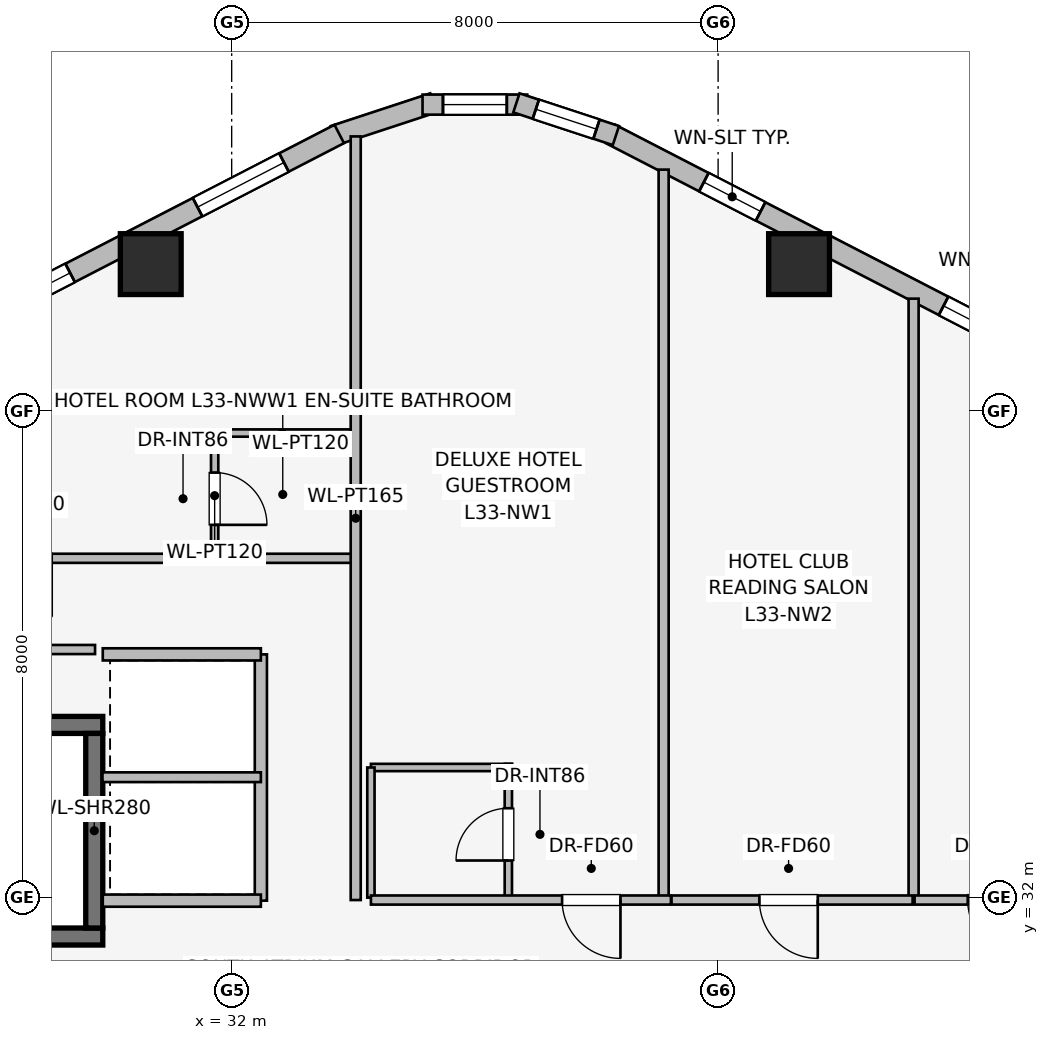
"""IFC4 building model, lengths in metres.
Left out: names, types, materials, properties, quantities, classifications, styles, units other than length and angle.
Written with IfcOpenShell. Run it as: python <this file> out.ifc"""

import sys

from ifc_helpers import new_model, si_unit, direction, frame, frame_2d, origin, origin_2d, place, context, subcontext, project, spatial, rectangle, extrude, element, fill, save


model = new_model("IFC4")
c1 = context("Model", 3, precision=1e-05, world=origin(), true_north=direction((0.0, 1.0)))
c2 = subcontext(c1, "Body", "Model", "MODEL_VIEW")
j1 = project(units=[si_unit("LENGTHUNIT", "METRE"), si_unit("PLANEANGLEUNIT", "RADIAN")], contexts=[c1])
p1 = place(None, origin())
s1 = spatial("IfcSite", under=j1, at=p1, CompositionType="ELEMENT")
p2 = place(p1, origin())
s2 = spatial("IfcBuilding", under=s1, at=p2, CompositionType="ELEMENT")
p3 = place(p2, frame((0.0, 0.0, 125.7)))
s3 = spatial("IfcBuildingStorey", under=s2, at=p3, CompositionType="ELEMENT", Elevation=125.7)
p4 = place(p3, frame((21.52, 31.36, 0.0), z_axis=(0.0, 0.0, 1.0), x_axis=(1.0, 0.0, 0.0)))
e1 = element("IfcWall", 1, at=p4, inside=s3, PredefinedType="SHEAR", context=c2, shape_type="SweptSolid", body=[
    extrude(rectangle(XDim=8.36, YDim=0.28, at=frame_2d((4.18, 0.0))), origin(), (0.0, 0.0, 1.0), 3.45),
])
p5 = place(p4, frame((0.45, 0.0, 0.0)))
e2 = element("IfcOpeningElement", 2, at=p5, cuts=e1, PredefinedType="OPENING", context=c2, shape_type="SweptSolid", body=[
    extrude(rectangle(XDim=1.05, YDim=2.0, at=frame_2d((0.525, 1.0))), frame((0.0, 0.15, 0.0), z_axis=(0.0, -1.0, 0.0), x_axis=(1.0, 0.0, 0.0)), (0.0, 0.0, 1.0), 0.3),
])
p6 = place(p3, frame((29.88, 34.84, 0.0), z_axis=(0.0, 0.0, 1.0), x_axis=(-1.0, 0.0, 0.0)))
e3 = element("IfcWall", 3, at=p6, inside=s3, PredefinedType="SHEAR", context=c2, shape_type="SweptSolid", body=[
    extrude(rectangle(XDim=8.36, YDim=0.28, at=frame_2d((4.18, 0.0))), origin(), (0.0, 0.0, 1.0), 3.45),
])
p7 = place(p3, frame((29.74, 31.5, 0.0), z_axis=(0.0, 0.0, 1.0), x_axis=(0.0, 1.0, 0.0)))
e4 = element("IfcWall", 4, at=p7, inside=s3, PredefinedType="SHEAR", context=c2, shape_type="SweptSolid", body=[
    extrude(rectangle(XDim=3.2, YDim=0.28, at=frame_2d((1.6, 0.0))), origin(), (0.0, 0.0, 1.0), 3.45),
])
for number, where, z_axis, x_axis in (
    (5, (41.331, 42.418, 0.0), (0.0, 0.0, 1.0), (1.0, 0.0, 0.0)),
    (6, (30.669, 42.418, 0.0), (0.0, 0.0, 1.0), (1.0, 0.0, 0.0)),
):
    element("IfcColumn", number, at=place(p3, frame(where, z_axis=z_axis, x_axis=x_axis)), inside=s3, PredefinedType="COLUMN", context=c2, shape_type="SweptSolid", body=[
        extrude(rectangle(XDim=1.0, YDim=1.0, at=origin_2d()), origin(), (0.0, 0.0, 1.0), 3.45),
    ])
p8 = place(p3, frame((38.231, 44.558, 0.0), z_axis=(0.0, 0.0, 1.0), x_axis=(0.888613612362, -0.458656568606, 0.0)))
e7 = element("IfcWall", 7, at=p8, inside=s3, PredefinedType="STANDARD", context=c2, shape_type="SweptSolid", body=[
    extrude(rectangle(XDim=18.681, YDim=0.34, at=frame_2d((9.34, 0.0))), origin(), (0.0, 0.0, 1.0), 3.19),
])
p9 = place(p8, frame((1.727, 0.0, 0.75)))
e8 = element("IfcOpeningElement", 8, at=p9, cuts=e7, PredefinedType="OPENING", context=c2, shape_type="SweptSolid", body=[
    extrude(rectangle(XDim=1.05, YDim=1.4, at=frame_2d((0.525, 0.7))), frame((0.0, 0.18, 0.0), z_axis=(0.0, -1.0, 0.0), x_axis=(1.0, 0.0, 0.0)), (0.0, 0.0, 1.0), 0.36),
])
p10 = place(p8, frame((6.163, 0.0, 0.75)))
e9 = element("IfcOpeningElement", 9, at=p10, cuts=e7, PredefinedType="OPENING", context=c2, shape_type="SweptSolid", body=[
    extrude(rectangle(XDim=2.1, YDim=1.5, at=frame_2d((1.05, 0.75))), frame((0.0, 0.18, 0.0), z_axis=(0.0, -1.0, 0.0), x_axis=(1.0, 0.0, 0.0)), (0.0, 0.0, 1.0), 0.36),
])
p11 = place(p8, frame((9.497, 0.0, 0.75)))
e10 = element("IfcOpeningElement", 10, at=p11, cuts=e7, PredefinedType="OPENING", context=c2, shape_type="SweptSolid", body=[
    extrude(rectangle(XDim=1.6, YDim=1.55, at=frame_2d((0.8, 0.775))), frame((0.0, 0.18, 0.0), z_axis=(0.0, -1.0, 0.0), x_axis=(1.0, 0.0, 0.0)), (0.0, 0.0, 1.0), 0.36),
])
p12 = place(p8, frame((12.728, 0.0, 0.75)))
e11 = element("IfcOpeningElement", 11, at=p12, cuts=e7, PredefinedType="OPENING", context=c2, shape_type="SweptSolid", body=[
    extrude(rectangle(XDim=1.05, YDim=1.4, at=frame_2d((0.525, 0.7))), frame((0.0, 0.18, 0.0), z_axis=(0.0, -1.0, 0.0), x_axis=(1.0, 0.0, 0.0)), (0.0, 0.0, 1.0), 0.36),
])
p13 = place(p8, frame((16.954, 0.0, 0.75)))
e12 = element("IfcOpeningElement", 12, at=p13, cuts=e7, PredefinedType="OPENING", context=c2, shape_type="SweptSolid", body=[
    extrude(rectangle(XDim=1.05, YDim=1.4, at=frame_2d((0.525, 0.7))), frame((0.0, 0.18, 0.0), z_axis=(0.0, -1.0, 0.0), x_axis=(1.0, 0.0, 0.0)), (0.0, 0.0, 1.0), 0.36),
])
p14 = place(p3, frame((33.681, 44.532, 0.0), z_axis=(0.0, 0.0, 1.0), x_axis=(0.949937416267, 0.312440242569, 0.0)))
e13 = element("IfcWall", 13, at=p14, inside=s3, PredefinedType="STANDARD", context=c2, shape_type="SweptSolid", body=[
    extrude(rectangle(XDim=1.722, YDim=0.33, at=frame_2d((0.861, 0.0))), origin(), (0.0, 0.0, 1.0), 3.19),
])
p15 = place(p3, frame((35.139, 45.041, 0.0), z_axis=(0.0, 0.0, 1.0), x_axis=(1.0, 0.0, 0.0)))
e14 = element("IfcWall", 14, at=p15, inside=s3, PredefinedType="STANDARD", context=c2, shape_type="SweptSolid", body=[
    extrude(rectangle(XDim=1.722, YDim=0.33, at=frame_2d((0.861, 0.0))), origin(), (0.0, 0.0, 1.0), 3.19),
])
p16 = place(p15, frame((0.336, 0.0, 0.75)))
e15 = element("IfcOpeningElement", 15, at=p16, cuts=e14, PredefinedType="OPENING", context=c2, shape_type="SweptSolid", body=[
    extrude(rectangle(XDim=1.05, YDim=1.4, at=frame_2d((0.525, 0.7))), frame((0.0, 0.175, 0.0), z_axis=(0.0, -1.0, 0.0), x_axis=(1.0, 0.0, 0.0)), (0.0, 0.0, 1.0), 0.35),
])
p17 = place(p3, frame((36.683, 45.07, 0.0), z_axis=(0.0, 0.0, 1.0), x_axis=(0.949937416267, -0.312440242569, 0.0)))
e16 = element("IfcWall", 16, at=p17, inside=s3, PredefinedType="STANDARD", context=c2, shape_type="SweptSolid", body=[
    extrude(rectangle(XDim=1.722, YDim=0.33, at=frame_2d((0.861, 0.0))), origin(), (0.0, 0.0, 1.0), 3.19),
])
p18 = place(p17, frame((0.336, 0.0, 0.75)))
e17 = element("IfcOpeningElement", 17, at=p18, cuts=e16, PredefinedType="OPENING", context=c2, shape_type="SweptSolid", body=[
    extrude(rectangle(XDim=1.05, YDim=1.4, at=frame_2d((0.525, 0.7))), frame((0.0, 0.175, 0.0), z_axis=(0.0, -1.0, 0.0), x_axis=(1.0, 0.0, 0.0)), (0.0, 0.0, 1.0), 0.35),
])
p19 = place(p3, frame((17.169, 35.99, 0.0), z_axis=(0.0, 0.0, 1.0), x_axis=(0.888613612362, 0.458656568606, 0.0)))
e18 = element("IfcWall", 18, at=p19, inside=s3, PredefinedType="STANDARD", context=c2, shape_type="SweptSolid", body=[
    extrude(rectangle(XDim=18.681, YDim=0.34, at=frame_2d((9.34, 0.0))), origin(), (0.0, 0.0, 1.0), 3.19),
])
p20 = place(p19, frame((1.023, 0.0, 0.75)))
e19 = element("IfcOpeningElement", 19, at=p20, cuts=e18, PredefinedType="OPENING", context=c2, shape_type="SweptSolid", body=[
    extrude(rectangle(XDim=1.6, YDim=1.55, at=frame_2d((0.8, 0.775))), frame((0.0, 0.18, 0.0), z_axis=(0.0, -1.0, 0.0), x_axis=(1.0, 0.0, 0.0)), (0.0, 0.0, 1.0), 0.36),
])
p21 = place(p19, frame((4.981, 0.0, 0.75)))
e20 = element("IfcOpeningElement", 20, at=p21, cuts=e18, PredefinedType="OPENING", context=c2, shape_type="SweptSolid", body=[
    extrude(rectangle(XDim=2.1, YDim=1.5, at=frame_2d((1.05, 0.75))), frame((0.0, 0.18, 0.0), z_axis=(0.0, -1.0, 0.0), x_axis=(1.0, 0.0, 0.0)), (0.0, 0.0, 1.0), 0.36),
])
p22 = place(p19, frame((8.29, 0.0, 0.75)))
e21 = element("IfcOpeningElement", 21, at=p22, cuts=e18, PredefinedType="OPENING", context=c2, shape_type="SweptSolid", body=[
    extrude(rectangle(XDim=2.1, YDim=1.5, at=frame_2d((1.05, 0.75))), frame((0.0, 0.18, 0.0), z_axis=(0.0, -1.0, 0.0), x_axis=(1.0, 0.0, 0.0)), (0.0, 0.0, 1.0), 0.36),
])
p23 = place(p19, frame((11.6, 0.0, 0.75)))
e22 = element("IfcOpeningElement", 22, at=p23, cuts=e18, PredefinedType="OPENING", context=c2, shape_type="SweptSolid", body=[
    extrude(rectangle(XDim=2.1, YDim=1.5, at=frame_2d((1.05, 0.75))), frame((0.0, 0.18, 0.0), z_axis=(0.0, -1.0, 0.0), x_axis=(1.0, 0.0, 0.0)), (0.0, 0.0, 1.0), 0.36),
])
p24 = place(p19, frame((16.058, 0.0, 0.75)))
e23 = element("IfcOpeningElement", 23, at=p24, cuts=e18, PredefinedType="OPENING", context=c2, shape_type="SweptSolid", body=[
    extrude(rectangle(XDim=1.6, YDim=1.55, at=frame_2d((0.8, 0.775))), frame((0.0, 0.18, 0.0), z_axis=(0.0, -1.0, 0.0), x_axis=(1.0, 0.0, 0.0)), (0.0, 0.0, 1.0), 0.36),
])
p25 = place(p3, frame((32.48, 31.95, 0.0), z_axis=(0.0, 0.0, 1.0), x_axis=(0.0, 1.0, 0.0)))
e24 = element("IfcWall", 24, at=p25, inside=s3, PredefinedType="PARTITIONING", context=c2, shape_type="SweptSolid", body=[
    extrude(rectangle(XDim=4.05, YDim=0.2, at=frame_2d((2.025, 0.0))), origin(), (0.0, 0.0, 1.0), 3.19),
])
for number, where, z_axis, x_axis in (
    (25, (29.88, 36.0, 0.0), (0.0, 0.0, 1.0), (1.0, 0.0, 0.0)),
    (26, (32.48, 31.95, 0.0), (0.0, 0.0, 1.0), (-1.0, 0.0, 0.0)),
):
    element("IfcWall", number, at=place(p3, frame(where, z_axis=z_axis, x_axis=x_axis)), inside=s3, PredefinedType="PARTITIONING", context=c2, shape_type="SweptSolid", body=[
        extrude(rectangle(XDim=2.6, YDim=0.2, at=frame_2d((1.3, 0.0))), origin(), (0.0, 0.0, 1.0), 3.19),
    ])
p26 = place(p3, frame((29.875, 33.98, 0.0), z_axis=(0.0, 0.0, 1.0), x_axis=(1.0, 0.0, 0.0)))
e27 = element("IfcWall", 27, at=p26, inside=s3, PredefinedType="PARTITIONING", context=c2, shape_type="SweptSolid", body=[
    extrude(rectangle(XDim=2.605, YDim=0.16, at=frame_2d((1.302, 0.0))), origin(), (0.0, 0.0, 1.0), 3.19),
])
p27 = place(p3, frame((34.0, 39.64, 0.0), z_axis=(0.0, 0.0, 1.0), x_axis=(-1.0, 0.0, 0.0)))
e28 = element("IfcWall", 28, at=p27, inside=s3, PredefinedType="PARTITIONING", context=c2, shape_type="SweptSolid", body=[
    extrude(rectangle(XDim=2.34, YDim=0.12, at=frame_2d((1.17, 0.0))), origin(), (0.0, 0.0, 1.0), 3.19),
])
p28 = place(p3, frame((31.72, 39.64, 0.0), z_axis=(0.0, 0.0, 1.0), x_axis=(0.0, -1.0, 0.0)))
e29 = element("IfcWall", 29, at=p28, inside=s3, PredefinedType="PARTITIONING", context=c2, shape_type="SweptSolid", body=[
    extrude(rectangle(XDim=2.06, YDim=0.12, at=frame_2d((1.03, 0.0))), origin(), (0.0, 0.0, 1.0), 3.19),
])
p29 = place(p28, frame((0.65, 0.0, 0.0)))
e30 = element("IfcOpeningElement", 30, at=p29, cuts=e29, PredefinedType="OPENING", context=c2, shape_type="SweptSolid", body=[
    extrude(rectangle(XDim=0.86, YDim=2.0, at=frame_2d((0.43, 1.0))), frame((0.0, 0.07, 0.0), z_axis=(0.0, -1.0, 0.0), x_axis=(1.0, 0.0, 0.0)), (0.0, 0.0, 1.0), 0.14),
])
p30 = place(p3, frame((34.0, 37.58, 0.0), z_axis=(0.0, 0.0, 1.0), x_axis=(-1.0, 0.0, 0.0)))
e31 = element("IfcWall", 31, at=p30, inside=s3, PredefinedType="PARTITIONING", context=c2, shape_type="SweptSolid", body=[
    extrude(rectangle(XDim=13.707, YDim=0.15, at=frame_2d((6.854, 0.0))), origin(), (0.0, 0.0, 1.0), 2.582),
])
p31 = place(p30, frame((4.96, 0.0, 0.0)))
e32 = element("IfcOpeningElement", 32, at=p31, cuts=e31, PredefinedType="OPENING", context=c2, shape_type="SweptSolid", body=[
    extrude(rectangle(XDim=0.96, YDim=2.0, at=frame_2d((0.48, 1.0))), frame((0.0, 0.085, 0.0), z_axis=(0.0, -1.0, 0.0), x_axis=(1.0, 0.0, 0.0)), (0.0, 0.0, 1.0), 0.17),
])
p32 = place(p3, frame((34.04, 31.96, 0.0), z_axis=(0.0, 0.0, 1.0), x_axis=(0.0, 1.0, 0.0)))
e33 = element("IfcWall", 33, at=p32, inside=s3, PredefinedType="PARTITIONING", context=c2, shape_type="SweptSolid", body=[
    extrude(rectangle(XDim=12.558, YDim=0.165, at=frame_2d((6.279, 0.0))), origin(), (0.0, 0.0, 1.0), 3.19),
])
p33 = place(p3, frame((39.104, 31.97, 0.0), z_axis=(0.0, 0.0, 1.0), x_axis=(0.0, 1.0, 0.0)))
e34 = element("IfcWall", 34, at=p33, inside=s3, PredefinedType="PARTITIONING", context=c2, shape_type="SweptSolid", body=[
    extrude(rectangle(XDim=12.002, YDim=0.165, at=frame_2d((6.001, 0.0))), origin(), (0.0, 0.0, 1.0), 3.19),
])
p34 = place(p3, frame((43.215, 31.97, 0.0), z_axis=(0.0, 0.0, 1.0), x_axis=(0.0, 1.0, 0.0)))
e35 = element("IfcWall", 35, at=p34, inside=s3, PredefinedType="PARTITIONING", context=c2, shape_type="SweptSolid", body=[
    extrude(rectangle(XDim=9.88, YDim=0.165, at=frame_2d((4.94, 0.0))), origin(), (0.0, 0.0, 1.0), 3.19),
])
p35 = place(p3, frame((36.55, 31.96, 0.0), z_axis=(0.0, 0.0, 1.0), x_axis=(0.0, 1.0, 0.0)))
e36 = element("IfcWall", 36, at=p35, inside=s3, PredefinedType="PARTITIONING", context=c2, shape_type="SweptSolid", body=[
    extrude(rectangle(XDim=2.24, YDim=0.12, at=frame_2d((1.12, 0.0))), origin(), (0.0, 0.0, 1.0), 3.19),
])
p36 = place(p35, frame((0.65, 0.0, 0.0)))
e37 = element("IfcOpeningElement", 37, at=p36, cuts=e36, PredefinedType="OPENING", context=c2, shape_type="SweptSolid", body=[
    extrude(rectangle(XDim=0.86, YDim=2.0, at=frame_2d((0.43, 1.0))), frame((0.0, 0.07, 0.0), z_axis=(0.0, -1.0, 0.0), x_axis=(1.0, 0.0, 0.0)), (0.0, 0.0, 1.0), 0.14),
])
p37 = place(p3, frame((36.61, 34.14, 0.0), z_axis=(0.0, 0.0, 1.0), x_axis=(-1.0, 0.0, 0.0)))
e38 = element("IfcWall", 38, at=p37, inside=s3, PredefinedType="PARTITIONING", context=c2, shape_type="SweptSolid", body=[
    extrude(rectangle(XDim=2.32, YDim=0.12, at=frame_2d((1.16, 0.0))), origin(), (0.0, 0.0, 1.0), 3.19),
])
p38 = place(p3, frame((34.29, 34.14, 0.0), z_axis=(0.0, 0.0, 1.0), x_axis=(0.0, -1.0, 0.0)))
e39 = element("IfcWall", 39, at=p38, inside=s3, PredefinedType="PARTITIONING", context=c2, shape_type="SweptSolid", body=[
    extrude(rectangle(XDim=2.14, YDim=0.12, at=frame_2d((1.07, 0.0))), origin(), (0.0, 0.0, 1.0), 3.19),
])
p39 = place(p3, frame((39.224, 31.96, 0.0), z_axis=(0.0, 0.0, 1.0), x_axis=(-1.0, 0.0, 0.0)))
e40 = element("IfcWall", 40, at=p39, inside=s3, PredefinedType="PARTITIONING", context=c2, shape_type="SweptSolid", body=[
    extrude(rectangle(XDim=4.934, YDim=0.15, at=frame_2d((2.467, 0.0))), origin(), (0.0, 0.0, 1.0), 3.19),
])
p40 = place(p39, frame((0.83, 0.0, 0.0)))
e41 = element("IfcOpeningElement", 41, at=p40, cuts=e40, PredefinedType="OPENING", context=c2, shape_type="SweptSolid", body=[
    extrude(rectangle(XDim=0.96, YDim=2.0, at=frame_2d((0.48, 1.0))), frame((0.0, 0.085, 0.0), z_axis=(0.0, -1.0, 0.0), x_axis=(1.0, 0.0, 0.0)), (0.0, 0.0, 1.0), 0.17),
])
p41 = place(p3, frame((43.199, 31.96, 0.0), z_axis=(0.0, 0.0, 1.0), x_axis=(-1.0, 0.0, 0.0)))
e42 = element("IfcWall", 42, at=p41, inside=s3, PredefinedType="PARTITIONING", context=c2, shape_type="SweptSolid", body=[
    extrude(rectangle(XDim=3.965, YDim=0.15, at=frame_2d((1.982, 0.0))), origin(), (0.0, 0.0, 1.0), 3.19),
])
p42 = place(p41, frame((1.56, 0.0, 0.0)))
e43 = element("IfcOpeningElement", 43, at=p42, cuts=e42, PredefinedType="OPENING", context=c2, shape_type="SweptSolid", body=[
    extrude(rectangle(XDim=0.96, YDim=2.0, at=frame_2d((0.48, 1.0))), frame((0.0, 0.085, 0.0), z_axis=(0.0, -1.0, 0.0), x_axis=(1.0, 0.0, 0.0)), (0.0, 0.0, 1.0), 0.17),
])
p43 = place(p3, frame((45.94, 31.96, 0.0), z_axis=(0.0, 0.0, 1.0), x_axis=(-1.0, 0.0, 0.0)))
e44 = element("IfcWall", 44, at=p43, inside=s3, PredefinedType="PARTITIONING", context=c2, shape_type="SweptSolid", body=[
    extrude(rectangle(XDim=2.709, YDim=0.15, at=frame_2d((1.354, 0.0))), origin(), (0.0, 0.0, 1.0), 3.19),
])
p44 = place(p43, frame((0.875, 0.0, 0.0)))
e45 = element("IfcOpeningElement", 45, at=p44, cuts=e44, PredefinedType="OPENING", context=c2, shape_type="SweptSolid", body=[
    extrude(rectangle(XDim=0.96, YDim=2.0, at=frame_2d((0.48, 1.0))), frame((0.0, 0.085, 0.0), z_axis=(0.0, -1.0, 0.0), x_axis=(1.0, 0.0, 0.0)), (0.0, 0.0, 1.0), 0.17),
])
p45 = place(p3, frame((29.753, 36.08, 0.0), z_axis=(0.0, 0.0, 1.0), x_axis=(-1.0, 0.0, 0.0)))
e46 = element("IfcWall", 46, at=p45, inside=s3, PredefinedType="PARTITIONING", context=c2, shape_type="SweptSolid", body=[
    extrude(rectangle(XDim=7.353, YDim=0.15, at=frame_2d((3.677, 0.0))), origin(), (0.0, 0.0, 1.0), 2.582),
])
p46 = place(p9, origin())
e47 = element("IfcWindow", 47, at=p46, inside=s3, PartitioningType="SINGLE_PANEL", PredefinedType="WINDOW", context=c2, shape_type="SweptSolid", body=[
    extrude(rectangle(XDim=1.05, YDim=1.4, at=frame_2d((0.525, 0.7))), frame((0.0, 0.03, 0.0), z_axis=(0.0, -1.0, 0.0), x_axis=(1.0, 0.0, 0.0)), (0.0, 0.0, 1.0), 0.06),
])
fill(e8, e47)
p47 = place(p10, origin())
e48 = element("IfcWindow", 48, at=p47, inside=s3, PartitioningType="SINGLE_PANEL", PredefinedType="WINDOW", context=c2, shape_type="SweptSolid", body=[
    extrude(rectangle(XDim=2.1, YDim=1.5, at=frame_2d((1.05, 0.75))), frame((0.0, 0.03, 0.0), z_axis=(0.0, -1.0, 0.0), x_axis=(1.0, 0.0, 0.0)), (0.0, 0.0, 1.0), 0.06),
])
fill(e9, e48)
p48 = place(p16, origin())
e49 = element("IfcWindow", 49, at=p48, inside=s3, PartitioningType="SINGLE_PANEL", PredefinedType="WINDOW", context=c2, shape_type="SweptSolid", body=[
    extrude(rectangle(XDim=1.05, YDim=1.4, at=frame_2d((0.525, 0.7))), frame((0.0, 0.03, 0.0), z_axis=(0.0, -1.0, 0.0), x_axis=(1.0, 0.0, 0.0)), (0.0, 0.0, 1.0), 0.06),
])
fill(e15, e49)
p49 = place(p18, origin())
e50 = element("IfcWindow", 50, at=p49, inside=s3, PartitioningType="SINGLE_PANEL", PredefinedType="WINDOW", context=c2, shape_type="SweptSolid", body=[
    extrude(rectangle(XDim=1.05, YDim=1.4, at=frame_2d((0.525, 0.7))), frame((0.0, 0.03, 0.0), z_axis=(0.0, -1.0, 0.0), x_axis=(1.0, 0.0, 0.0)), (0.0, 0.0, 1.0), 0.06),
])
fill(e17, e50)
p50 = place(p23, origin())
e51 = element("IfcWindow", 51, at=p50, inside=s3, PartitioningType="SINGLE_PANEL", PredefinedType="WINDOW", context=c2, shape_type="SweptSolid", body=[
    extrude(rectangle(XDim=2.1, YDim=1.5, at=frame_2d((1.05, 0.75))), frame((0.0, 0.03, 0.0), z_axis=(0.0, -1.0, 0.0), x_axis=(1.0, 0.0, 0.0)), (0.0, 0.0, 1.0), 0.06),
])
fill(e22, e51)
p51 = place(p24, origin())
e52 = element("IfcWindow", 52, at=p51, inside=s3, PartitioningType="SINGLE_PANEL", PredefinedType="WINDOW", context=c2, shape_type="SweptSolid", body=[
    extrude(rectangle(XDim=1.6, YDim=1.55, at=frame_2d((0.8, 0.775))), frame((0.0, 0.03, 0.0), z_axis=(0.0, -1.0, 0.0), x_axis=(1.0, 0.0, 0.0)), (0.0, 0.0, 1.0), 0.06),
])
fill(e23, e52)
p52 = place(p29, origin())
e53 = element("IfcDoor", 53, at=p52, inside=s3, OperationType="SINGLE_SWING_RIGHT", PredefinedType="DOOR", context=c2, shape_type="SweptSolid", body=[
    extrude(rectangle(XDim=0.86, YDim=2.0, at=frame_2d((0.43, 1.0))), frame((0.0, 0.025, 0.0), z_axis=(0.0, -1.0, 0.0), x_axis=(1.0, 0.0, 0.0)), (0.0, 0.0, 1.0), 0.05),
])
fill(e30, e53)
p53 = place(p36, origin())
e54 = element("IfcDoor", 54, at=p53, inside=s3, OperationType="SINGLE_SWING_LEFT", PredefinedType="DOOR", context=c2, shape_type="SweptSolid", body=[
    extrude(rectangle(XDim=0.86, YDim=2.0, at=frame_2d((0.43, 1.0))), frame((0.0, 0.025, 0.0), z_axis=(0.0, -1.0, 0.0), x_axis=(1.0, 0.0, 0.0)), (0.0, 0.0, 1.0), 0.05),
])
fill(e37, e54)
p54 = place(p40, origin())
e55 = element("IfcDoor", 55, at=p54, inside=s3, OperationType="SINGLE_SWING_LEFT", PredefinedType="DOOR", context=c2, shape_type="SweptSolid", body=[
    extrude(rectangle(XDim=0.96, YDim=2.0, at=frame_2d((0.48, 1.0))), frame((0.0, 0.025, 0.0), z_axis=(0.0, -1.0, 0.0), x_axis=(1.0, 0.0, 0.0)), (0.0, 0.0, 1.0), 0.05),
])
fill(e41, e55)
p55 = place(p42, origin())
e56 = element("IfcDoor", 56, at=p55, inside=s3, OperationType="SINGLE_SWING_LEFT", PredefinedType="DOOR", context=c2, shape_type="SweptSolid", body=[
    extrude(rectangle(XDim=0.96, YDim=2.0, at=frame_2d((0.48, 1.0))), frame((0.0, 0.025, 0.0), z_axis=(0.0, -1.0, 0.0), x_axis=(1.0, 0.0, 0.0)), (0.0, 0.0, 1.0), 0.05),
])
fill(e43, e56)
p56 = place(p44, origin())
e57 = element("IfcDoor", 57, at=p56, inside=s3, OperationType="SINGLE_SWING_LEFT", PredefinedType="DOOR", context=c2, shape_type="SweptSolid", body=[
    extrude(rectangle(XDim=0.96, YDim=2.0, at=frame_2d((0.48, 1.0))), frame((0.0, 0.025, 0.0), z_axis=(0.0, -1.0, 0.0), x_axis=(1.0, 0.0, 0.0)), (0.0, 0.0, 1.0), 0.05),
])
fill(e45, e57)
save(model, sys.argv[1])
